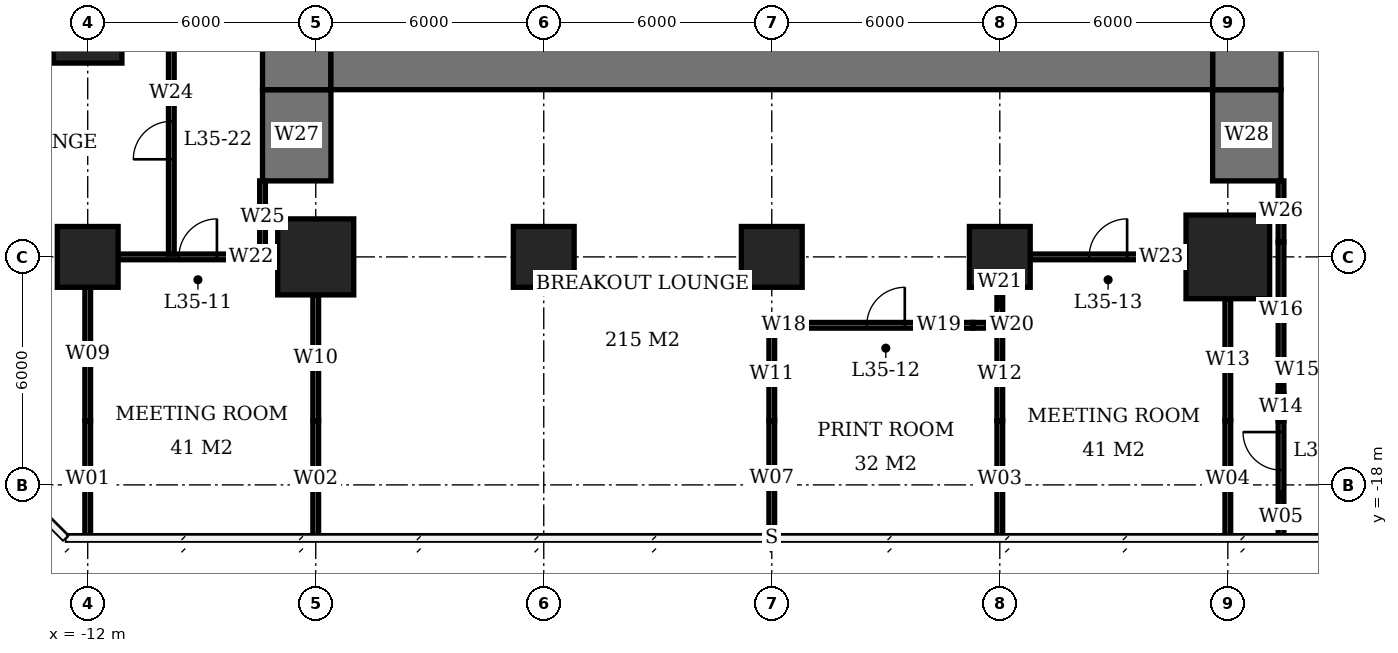
"""IFC4 building model, lengths in metres.
Left out: names, types, materials, properties, quantities, classifications, styles, units other than length and angle.
Written with IfcOpenShell. Run it as: python <this file> out.ifc"""

import sys

from ifc_helpers import new_model, si_unit, direction, frame, frame_2d, origin, origin_2d, place, context, subcontext, project, spatial, rectangle, extrude, element, fill, save


model = new_model("IFC4")
c1 = context("Model", 3, precision=1e-05, world=origin(), true_north=direction((0.0, 1.0)))
c2 = subcontext(c1, "Body", "Model", "MODEL_VIEW")
j1 = project(units=[si_unit("LENGTHUNIT", "METRE"), si_unit("PLANEANGLEUNIT", "RADIAN")], contexts=[c1])
p1 = place(None, origin())
s1 = spatial("IfcSite", under=j1, at=p1, CompositionType="ELEMENT")
p2 = place(p1, origin())
s2 = spatial("IfcBuilding", under=s1, at=p2, CompositionType="ELEMENT")
p3 = place(p2, frame((0.0, 0.0, 144.5)))
s3 = spatial("IfcBuildingStorey", under=s2, at=p3, CompositionType="ELEMENT", Elevation=144.5)
p4 = place(p3, frame((-12.0, -12.0, 0.0), z_axis=(0.0, 0.0, 1.0), x_axis=(1.0, 0.0, 0.0)))
e1 = element("IfcColumn", 1, at=p4, inside=s3, PredefinedType="COLUMN", context=c2, shape_type="SweptSolid", body=[
    extrude(rectangle(XDim=1.6, YDim=1.6, at=origin_2d()), origin(), (0.0, 0.0, 1.0), 3.9),
])
p5 = place(p3, frame((-12.0, -6.0, 0.0), z_axis=(0.0, 0.0, 1.0), x_axis=(1.0, 0.0, 0.0)))
e2 = element("IfcColumn", 2, at=p5, inside=s3, PredefinedType="COLUMN", context=c2, shape_type="SweptSolid", body=[
    extrude(rectangle(XDim=1.8, YDim=1.8, at=origin_2d()), origin(), (0.0, 0.0, 1.0), 3.9),
])
p6 = place(p3, frame((-6.0, -12.0, 0.0), z_axis=(0.0, 0.0, 1.0), x_axis=(1.0, 0.0, 0.0)))
e3 = element("IfcColumn", 3, at=p6, inside=s3, PredefinedType="COLUMN", context=c2, shape_type="SweptSolid", body=[
    extrude(rectangle(XDim=2.0, YDim=2.0, at=origin_2d()), origin(), (0.0, 0.0, 1.0), 3.9),
])
for number, where, z_axis, x_axis in (
    (4, (0.0, -12.0, 0.0), (0.0, 0.0, 1.0), (1.0, 0.0, 0.0)),
    (5, (6.0, -12.0, 0.0), (0.0, 0.0, 1.0), (1.0, 0.0, 0.0)),
    (6, (12.0, -12.0, 0.0), (0.0, 0.0, 1.0), (1.0, 0.0, 0.0)),
):
    element("IfcColumn", number, at=place(p3, frame(where, z_axis=z_axis, x_axis=x_axis)), inside=s3, PredefinedType="COLUMN", context=c2, shape_type="SweptSolid", body=[
        extrude(rectangle(XDim=1.6, YDim=1.6, at=origin_2d()), origin(), (0.0, 0.0, 1.0), 3.9),
    ])
p7 = place(p3, frame((18.0, -12.0, 0.0), z_axis=(0.0, 0.0, 1.0), x_axis=(1.0, 0.0, 0.0)))
e7 = element("IfcColumn", 7, at=p7, inside=s3, PredefinedType="COLUMN", context=c2, shape_type="SweptSolid", body=[
    extrude(rectangle(XDim=2.2, YDim=2.2, at=origin_2d()), origin(), (0.0, 0.0, 1.0), 3.9),
])
p8 = place(p3, frame((-5.6, -6.6, 0.0), z_axis=(0.0, 0.0, 1.0), x_axis=(1.0, 0.0, 0.0)))
e8 = element("IfcWall", 8, at=p8, inside=s3, PredefinedType="SHEAR", context=c2, shape_type="SweptSolid", body=[
    extrude(rectangle(XDim=23.2, YDim=2.0, at=frame_2d((11.6, 0.0))), origin(), (0.0, 0.0, 1.0), 3.9),
])
p9 = place(p3, frame((-6.5, -7.6, 0.0), z_axis=(0.0, 0.0, 1.0), x_axis=(0.0, 1.0, 0.0)))
e9 = element("IfcWall", 9, at=p9, inside=s3, PredefinedType="SHEAR", context=c2, shape_type="SweptSolid", body=[
    extrude(rectangle(XDim=21.2, YDim=1.8, at=frame_2d((10.6, 0.0))), origin(), (0.0, 0.0, 1.0), 3.9),
])
p10 = place(p9, frame((7.8, 0.0, 0.0)))
e10 = element("IfcOpeningElement", 10, at=p10, cuts=e9, PredefinedType="OPENING", context=c2, shape_type="SweptSolid", body=[
    extrude(rectangle(XDim=1.8, YDim=2.4, at=frame_2d((0.9, 1.2))), frame((0.0, 0.91, 0.0), z_axis=(0.0, -1.0, 0.0), x_axis=(1.0, 0.0, 0.0)), (0.0, 0.0, 1.0), 1.82),
])
p11 = place(p3, frame((18.5, -7.6, 0.0), z_axis=(0.0, 0.0, 1.0), x_axis=(0.0, 1.0, 0.0)))
e11 = element("IfcWall", 11, at=p11, inside=s3, PredefinedType="SHEAR", context=c2, shape_type="SweptSolid", body=[
    extrude(rectangle(XDim=21.2, YDim=1.8, at=frame_2d((10.6, 0.0))), origin(), (0.0, 0.0, 1.0), 3.9),
])
p12 = place(p11, frame((9.2, 0.0, 0.0)))
e12 = element("IfcOpeningElement", 12, at=p12, cuts=e11, PredefinedType="OPENING", context=c2, shape_type="SweptSolid", body=[
    extrude(rectangle(XDim=1.8, YDim=2.4, at=frame_2d((0.9, 1.2))), frame((0.0, 0.91, 0.0), z_axis=(0.0, -1.0, 0.0), x_axis=(1.0, 0.0, 0.0)), (0.0, 0.0, 1.0), 1.82),
])
for number, where, z_axis, x_axis in (
    (13, (-6.5, -10.0, 0.0), (0.0, 0.0, 1.0), (0.0, 1.0, 0.0)),
    (14, (18.5, -10.0, 0.0), (0.0, 0.0, 1.0), (0.0, 1.0, 0.0)),
):
    element("IfcWall", number, at=place(p3, frame(where, z_axis=z_axis, x_axis=x_axis)), inside=s3, PredefinedType="SHEAR", context=c2, shape_type="SweptSolid", body=[
        extrude(rectangle(XDim=2.4, YDim=1.8, at=frame_2d((1.2, 0.0))), origin(), (0.0, 0.0, 1.0), 3.9),
    ])
p13 = place(p3, frame((5.925, -13.8, 0.0), z_axis=(0.0, 0.0, 1.0), x_axis=(1.0, 0.0, 0.0)))
e15 = element("IfcWall", 15, at=p13, inside=s3, PredefinedType="PARTITIONING", context=c2, shape_type="SweptSolid", body=[
    extrude(rectangle(XDim=0.785, YDim=0.15, at=frame_2d((0.393, 0.0))), origin(), (0.0, 0.0, 1.0), 2.65),
])
p14 = place(p3, frame((6.71, -13.8, 0.0), z_axis=(0.0, 0.0, 1.0), x_axis=(1.0, 0.0, 0.0)))
e16 = element("IfcWall", 16, at=p14, inside=s3, PredefinedType="PARTITIONING", context=c2, shape_type="SweptSolid", body=[
    extrude(rectangle(XDim=4.58, YDim=0.15, at=frame_2d((2.29, 0.0))), origin(), (0.0, 0.0, 1.0), 3.65),
])
p15 = place(p14, frame((1.79, 0.0, 0.0)))
e17 = element("IfcOpeningElement", 17, at=p15, cuts=e16, PredefinedType="OPENING", context=c2, shape_type="SweptSolid", body=[
    extrude(rectangle(XDim=1.0, YDim=2.1, at=frame_2d((0.5, 1.05))), frame((0.0, 0.085, 0.0), z_axis=(0.0, -1.0, 0.0), x_axis=(1.0, 0.0, 0.0)), (0.0, 0.0, 1.0), 0.17),
])
p16 = place(p3, frame((11.29, -13.8, 0.0), z_axis=(0.0, 0.0, 1.0), x_axis=(1.0, 0.0, 0.0)))
e18 = element("IfcWall", 18, at=p16, inside=s3, PredefinedType="PARTITIONING", context=c2, shape_type="SweptSolid", body=[
    extrude(rectangle(XDim=0.86, YDim=0.15, at=frame_2d((0.43, 0.0))), origin(), (0.0, 0.0, 1.0), 2.65),
])
p17 = place(p3, frame((-11.2, -12.0, 0.0), z_axis=(0.0, 0.0, 1.0), x_axis=(1.0, 0.0, 0.0)))
e19 = element("IfcWall", 19, at=p17, inside=s3, PredefinedType="PARTITIONING", context=c2, shape_type="SweptSolid", body=[
    extrude(rectangle(XDim=4.2, YDim=0.15, at=frame_2d((2.1, 0.0))), origin(), (0.0, 0.0, 1.0), 3.65),
])
p18 = place(p17, frame((1.6, 0.0, 0.0)))
e20 = element("IfcOpeningElement", 20, at=p18, cuts=e19, PredefinedType="OPENING", context=c2, shape_type="SweptSolid", body=[
    extrude(rectangle(XDim=1.0, YDim=2.1, at=frame_2d((0.5, 1.05))), frame((0.0, 0.085, 0.0), z_axis=(0.0, -1.0, 0.0), x_axis=(1.0, 0.0, 0.0)), (0.0, 0.0, 1.0), 0.17),
])
p19 = place(p3, frame((12.8, -12.0, 0.0), z_axis=(0.0, 0.0, 1.0), x_axis=(1.0, 0.0, 0.0)))
e21 = element("IfcWall", 21, at=p19, inside=s3, PredefinedType="PARTITIONING", context=c2, shape_type="SweptSolid", body=[
    extrude(rectangle(XDim=4.1, YDim=0.15, at=frame_2d((2.05, 0.0))), origin(), (0.0, 0.0, 1.0), 3.65),
])
p20 = place(p19, frame((1.55, 0.0, 0.0)))
e22 = element("IfcOpeningElement", 22, at=p20, cuts=e21, PredefinedType="OPENING", context=c2, shape_type="SweptSolid", body=[
    extrude(rectangle(XDim=1.0, YDim=2.1, at=frame_2d((0.5, 1.05))), frame((0.0, 0.085, 0.0), z_axis=(0.0, -1.0, 0.0), x_axis=(1.0, 0.0, 0.0)), (0.0, 0.0, 1.0), 0.17),
])
p21 = place(p3, frame((-12.0, -19.4, 0.0), z_axis=(0.0, 0.0, 1.0), x_axis=(0.0, 1.0, 0.0)))
e23 = element("IfcWall", 23, at=p21, inside=s3, PredefinedType="PARTITIONING", context=c2, shape_type="SweptSolid", body=[
    extrude(rectangle(XDim=3.09, YDim=0.15, at=frame_2d((1.545, 0.0))), origin(), (0.0, 0.0, 1.0), 3.65),
])
p22 = place(p3, frame((-12.0, -16.31, 0.0), z_axis=(0.0, 0.0, 1.0), x_axis=(0.0, 1.0, 0.0)))
e24 = element("IfcWall", 24, at=p22, inside=s3, PredefinedType="PARTITIONING", context=c2, shape_type="SweptSolid", body=[
    extrude(rectangle(XDim=3.51, YDim=0.15, at=frame_2d((1.755, 0.0))), origin(), (0.0, 0.0, 1.0), 2.65),
])
p23 = place(p3, frame((-6.0, -19.4, 0.0), z_axis=(0.0, 0.0, 1.0), x_axis=(0.0, 1.0, 0.0)))
e25 = element("IfcWall", 25, at=p23, inside=s3, PredefinedType="PARTITIONING", context=c2, shape_type="SweptSolid", body=[
    extrude(rectangle(XDim=3.09, YDim=0.15, at=frame_2d((1.545, 0.0))), origin(), (0.0, 0.0, 1.0), 3.65),
])
p24 = place(p3, frame((-6.0, -16.31, 0.0), z_axis=(0.0, 0.0, 1.0), x_axis=(0.0, 1.0, 0.0)))
e26 = element("IfcWall", 26, at=p24, inside=s3, PredefinedType="PARTITIONING", context=c2, shape_type="SweptSolid", body=[
    extrude(rectangle(XDim=3.31, YDim=0.15, at=frame_2d((1.655, 0.0))), origin(), (0.0, 0.0, 1.0), 2.65),
])
p25 = place(p3, frame((6.0, -19.35, 0.0), z_axis=(0.0, 0.0, 1.0), x_axis=(0.0, 1.0, 0.0)))
e27 = element("IfcWall", 27, at=p25, inside=s3, PredefinedType="PARTITIONING", context=c2, shape_type="SweptSolid", body=[
    extrude(rectangle(XDim=3.04, YDim=0.15, at=frame_2d((1.52, 0.0))), origin(), (0.0, 0.0, 1.0), 3.65),
])
p26 = place(p3, frame((6.0, -16.31, 0.0), z_axis=(0.0, 0.0, 1.0), x_axis=(0.0, 1.0, 0.0)))
e28 = element("IfcWall", 28, at=p26, inside=s3, PredefinedType="PARTITIONING", context=c2, shape_type="SweptSolid", body=[
    extrude(rectangle(XDim=2.435, YDim=0.15, at=frame_2d((1.218, 0.0))), origin(), (0.0, 0.0, 1.0), 2.65),
])
p27 = place(p3, frame((12.0, -19.4, 0.0), z_axis=(0.0, 0.0, 1.0), x_axis=(0.0, 1.0, 0.0)))
e29 = element("IfcWall", 29, at=p27, inside=s3, PredefinedType="PARTITIONING", context=c2, shape_type="SweptSolid", body=[
    extrude(rectangle(XDim=3.09, YDim=0.15, at=frame_2d((1.545, 0.0))), origin(), (0.0, 0.0, 1.0), 3.65),
])
p28 = place(p3, frame((12.0, -16.31, 0.0), z_axis=(0.0, 0.0, 1.0), x_axis=(0.0, 1.0, 0.0)))
e30 = element("IfcWall", 30, at=p28, inside=s3, PredefinedType="PARTITIONING", context=c2, shape_type="SweptSolid", body=[
    extrude(rectangle(XDim=2.435, YDim=0.15, at=frame_2d((1.218, 0.0))), origin(), (0.0, 0.0, 1.0), 2.65),
])
p29 = place(p3, frame((12.0, -13.725, 0.0), z_axis=(0.0, 0.0, 1.0), x_axis=(0.0, 1.0, 0.0)))
e31 = element("IfcWall", 31, at=p29, inside=s3, PredefinedType="PARTITIONING", context=c2, shape_type="SweptSolid", body=[
    extrude(rectangle(XDim=0.925, YDim=0.15, at=frame_2d((0.462, 0.0))), origin(), (0.0, 0.0, 1.0), 2.65),
])
p30 = place(p3, frame((18.0, -19.4, 0.0), z_axis=(0.0, 0.0, 1.0), x_axis=(0.0, 1.0, 0.0)))
e32 = element("IfcWall", 32, at=p30, inside=s3, PredefinedType="PARTITIONING", context=c2, shape_type="SweptSolid", body=[
    extrude(rectangle(XDim=3.09, YDim=0.15, at=frame_2d((1.545, 0.0))), origin(), (0.0, 0.0, 1.0), 3.65),
])
p31 = place(p3, frame((18.0, -16.31, 0.0), z_axis=(0.0, 0.0, 1.0), x_axis=(0.0, 1.0, 0.0)))
e33 = element("IfcWall", 33, at=p31, inside=s3, PredefinedType="PARTITIONING", context=c2, shape_type="SweptSolid", body=[
    extrude(rectangle(XDim=3.21, YDim=0.15, at=frame_2d((1.605, 0.0))), origin(), (0.0, 0.0, 1.0), 2.65),
])
p32 = place(p3, frame((-9.8, -11.925, 0.0), z_axis=(0.0, 0.0, 1.0), x_axis=(0.0, 1.0, 0.0)))
e34 = element("IfcWall", 34, at=p32, inside=s3, PredefinedType="PARTITIONING", context=c2, shape_type="SweptSolid", body=[
    extrude(rectangle(XDim=8.475, YDim=0.15, at=frame_2d((4.238, 0.0))), origin(), (0.0, 0.0, 1.0), 3.65),
])
p33 = place(p32, frame((2.493, 0.0, 0.0)))
e35 = element("IfcOpeningElement", 35, at=p33, cuts=e34, PredefinedType="OPENING", context=c2, shape_type="SweptSolid", body=[
    extrude(rectangle(XDim=1.0, YDim=2.1, at=frame_2d((0.5, 1.05))), frame((0.0, 0.085, 0.0), z_axis=(0.0, -1.0, 0.0), x_axis=(1.0, 0.0, 0.0)), (0.0, 0.0, 1.0), 0.17),
])
p34 = place(p3, frame((-7.4, -11.925, 0.0), z_axis=(0.0, 0.0, 1.0), x_axis=(0.0, 1.0, 0.0)))
e36 = element("IfcWall", 36, at=p34, inside=s3, PredefinedType="PARTITIONING", context=c2, shape_type="SweptSolid", body=[
    extrude(rectangle(XDim=1.925, YDim=0.15, at=frame_2d((0.962, 0.0))), origin(), (0.0, 0.0, 1.0), 3.65),
])
p35 = place(p3, frame((19.4, -19.4, 0.0), z_axis=(0.0, 0.0, 1.0), x_axis=(0.0, 1.0, 0.0)))
e37 = element("IfcWall", 37, at=p35, inside=s3, PredefinedType="PARTITIONING", context=c2, shape_type="SweptSolid", body=[
    extrude(rectangle(XDim=3.09, YDim=0.15, at=frame_2d((1.545, 0.0))), origin(), (0.0, 0.0, 1.0), 3.65),
])
p36 = place(p35, frame((1.79, 0.0, 0.0)))
e38 = element("IfcOpeningElement", 38, at=p36, cuts=e37, PredefinedType="OPENING", context=c2, shape_type="SweptSolid", body=[
    extrude(rectangle(XDim=1.0, YDim=2.1, at=frame_2d((0.5, 1.05))), frame((0.0, 0.085, 0.0), z_axis=(0.0, -1.0, 0.0), x_axis=(1.0, 0.0, 0.0)), (0.0, 0.0, 1.0), 0.17),
])
p37 = place(p3, frame((19.4, -16.31, 0.0), z_axis=(0.0, 0.0, 1.0), x_axis=(0.0, 1.0, 0.0)))
e39 = element("IfcWall", 39, at=p37, inside=s3, PredefinedType="PARTITIONING", context=c2, shape_type="SweptSolid", body=[
    extrude(rectangle(XDim=0.72, YDim=0.15, at=frame_2d((0.36, 0.0))), origin(), (0.0, 0.0, 1.0), 2.65),
])
p38 = place(p3, frame((19.4, -15.59, 0.0), z_axis=(0.0, 0.0, 1.0), x_axis=(0.0, 1.0, 0.0)))
e40 = element("IfcWall", 40, at=p38, inside=s3, PredefinedType="PARTITIONING", context=c2, shape_type="SweptSolid", body=[
    extrude(rectangle(XDim=0.398, YDim=0.15, at=frame_2d((0.199, 0.0))), origin(), (0.0, 0.0, 1.0), 3.65),
])
p39 = place(p3, frame((19.4, -15.192, 0.0), z_axis=(0.0, 0.0, 1.0), x_axis=(0.0, 1.0, 0.0)))
e41 = element("IfcWall", 41, at=p39, inside=s3, PredefinedType="PARTITIONING", context=c2, shape_type="SweptSolid", body=[
    extrude(rectangle(XDim=3.584, YDim=0.15, at=frame_2d((1.792, 0.0))), origin(), (0.0, 0.0, 1.0), 2.65),
])
p40 = place(p3, frame((19.4, -11.608, 0.0), z_axis=(0.0, 0.0, 1.0), x_axis=(0.0, 1.0, 0.0)))
e42 = element("IfcWall", 42, at=p40, inside=s3, PredefinedType="PARTITIONING", context=c2, shape_type="SweptSolid", body=[
    extrude(rectangle(XDim=1.608, YDim=0.15, at=frame_2d((0.804, 0.0))), origin(), (0.0, 0.0, 1.0), 3.65),
])
p41 = place(p18, origin())
e43 = element("IfcDoor", 43, at=p41, inside=s3, OperationType="SINGLE_SWING_RIGHT", PredefinedType="DOOR", context=c2, shape_type="SweptSolid", body=[
    extrude(rectangle(XDim=1.0, YDim=2.1, at=frame_2d((0.5, 1.05))), frame((0.0, 0.025, 0.0), z_axis=(0.0, -1.0, 0.0), x_axis=(1.0, 0.0, 0.0)), (0.0, 0.0, 1.0), 0.05),
])
fill(e20, e43)
p42 = place(p15, origin())
e44 = element("IfcDoor", 44, at=p42, inside=s3, OperationType="SINGLE_SWING_RIGHT", PredefinedType="DOOR", context=c2, shape_type="SweptSolid", body=[
    extrude(rectangle(XDim=1.0, YDim=2.1, at=frame_2d((0.5, 1.05))), frame((0.0, 0.025, 0.0), z_axis=(0.0, -1.0, 0.0), x_axis=(1.0, 0.0, 0.0)), (0.0, 0.0, 1.0), 0.05),
])
fill(e17, e44)
p43 = place(p20, origin())
e45 = element("IfcDoor", 45, at=p43, inside=s3, OperationType="SINGLE_SWING_RIGHT", PredefinedType="DOOR", context=c2, shape_type="SweptSolid", body=[
    extrude(rectangle(XDim=1.0, YDim=2.1, at=frame_2d((0.5, 1.05))), frame((0.0, 0.025, 0.0), z_axis=(0.0, -1.0, 0.0), x_axis=(1.0, 0.0, 0.0)), (0.0, 0.0, 1.0), 0.05),
])
fill(e22, e45)
p44 = place(p36, origin())
e46 = element("IfcDoor", 46, at=p44, inside=s3, OperationType="SINGLE_SWING_RIGHT", PredefinedType="DOOR", context=c2, shape_type="SweptSolid", body=[
    extrude(rectangle(XDim=1.0, YDim=2.1, at=frame_2d((0.5, 1.05))), frame((0.0, 0.025, 0.0), z_axis=(0.0, -1.0, 0.0), x_axis=(1.0, 0.0, 0.0)), (0.0, 0.0, 1.0), 0.05),
])
fill(e38, e46)
p45 = place(p33, origin())
e47 = element("IfcDoor", 47, at=p45, inside=s3, OperationType="SINGLE_SWING_LEFT", PredefinedType="DOOR", context=c2, shape_type="SweptSolid", body=[
    extrude(rectangle(XDim=1.0, YDim=2.1, at=frame_2d((0.5, 1.05))), frame((0.0, 0.025, 0.0), z_axis=(0.0, -1.0, 0.0), x_axis=(1.0, 0.0, 0.0)), (0.0, 0.0, 1.0), 0.05),
])
fill(e35, e47)
save(model, sys.argv[1])
